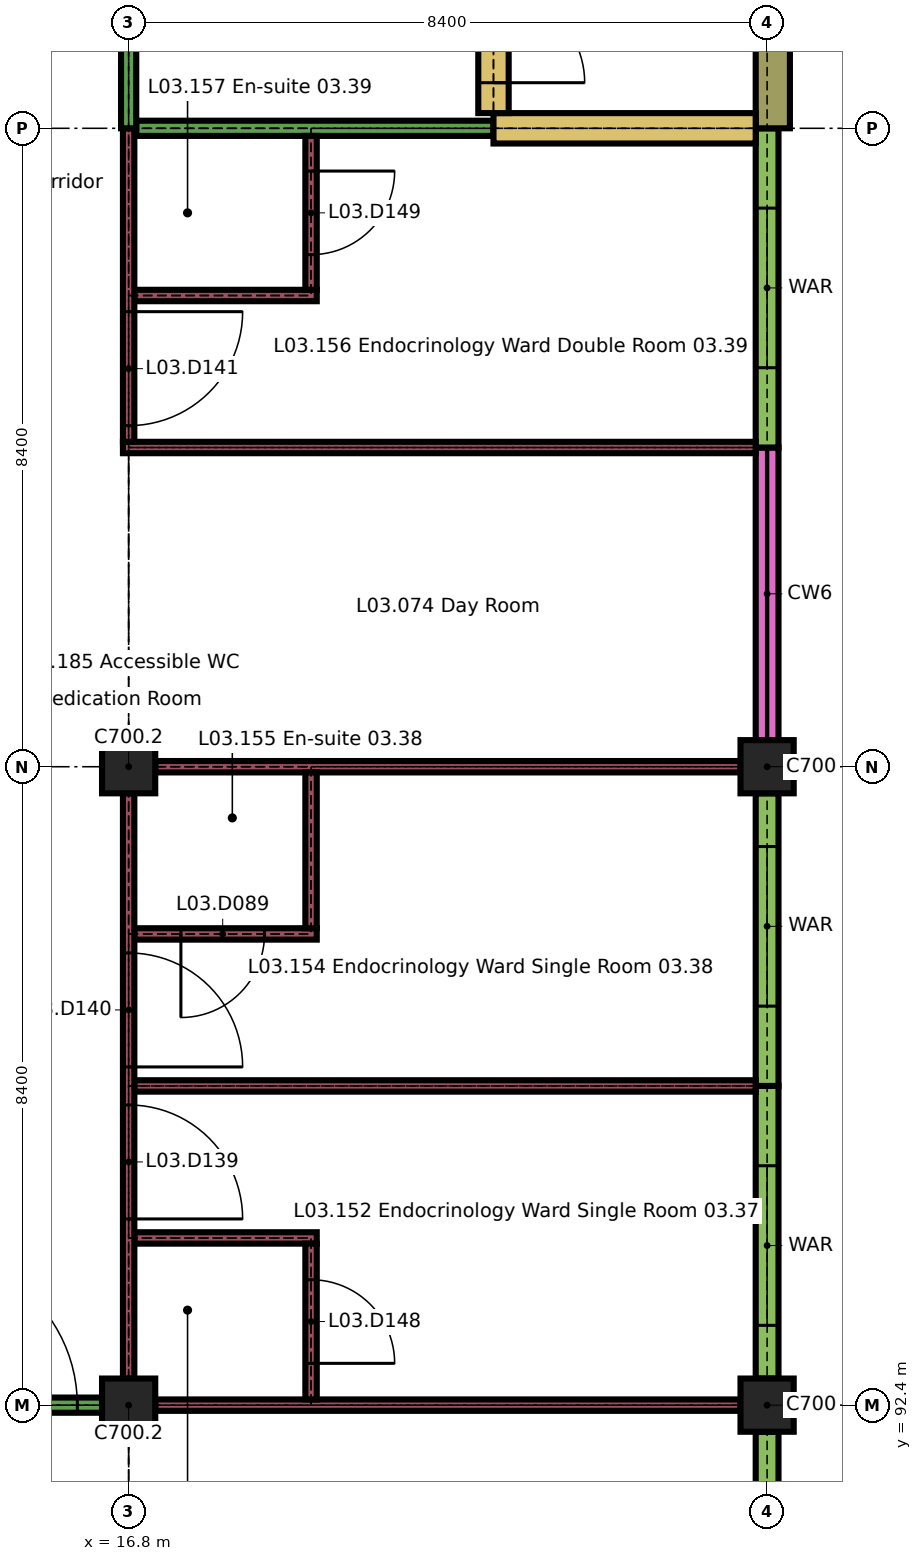
"""IFC4 building model, lengths in metres.
Left out: names, types, materials, properties, quantities, classifications, styles, units other than length and angle.
Written with IfcOpenShell. Run it as: python <this file> out.ifc"""

import sys

from ifc_helpers import new_model, si_unit, direction, frame, frame_2d, origin, origin_2d, place, context, subcontext, project, spatial, rectangle, extrude, element, fill, save


model = new_model("IFC4")
c1 = context("Model", 3, precision=1e-05, world=origin(), true_north=direction((0.0, 1.0)))
c2 = subcontext(c1, "Body", "Model", "MODEL_VIEW")
j1 = project(units=[si_unit("LENGTHUNIT", "METRE"), si_unit("PLANEANGLEUNIT", "RADIAN")], contexts=[c1])
p1 = place(None, origin())
s1 = spatial("IfcSite", under=j1, at=p1, CompositionType="ELEMENT")
p2 = place(p1, origin())
s2 = spatial("IfcBuilding", under=s1, at=p2, CompositionType="ELEMENT")
p3 = place(p2, frame((0.0, 0.0, 15.3)))
s3 = spatial("IfcBuildingStorey", under=s2, at=p3, CompositionType="ELEMENT", Elevation=15.3)
for number, where, z_axis, x_axis in (
    (1, (16.8, 92.4, 0.0), (0.0, 0.0, 1.0), (1.0, 0.0, 0.0)),
    (2, (25.2, 92.4, 0.0), (0.0, 0.0, 1.0), (1.0, 0.0, 0.0)),
    (3, (16.8, 100.8, 0.0), (0.0, 0.0, 1.0), (1.0, 0.0, 0.0)),
    (4, (25.2, 100.8, 0.0), (0.0, 0.0, 1.0), (1.0, 0.0, 0.0)),
):
    element("IfcColumn", number, at=place(p3, frame(where, z_axis=z_axis, x_axis=x_axis)), inside=s3, PredefinedType="COLUMN", context=c2, shape_type="SweptSolid", body=[
        extrude(rectangle(XDim=0.7, YDim=0.7, at=origin_2d()), origin(), (0.0, 0.0, 1.0), 3.26),
    ])
p4 = place(p3, frame((25.2, 90.9, 0.0), z_axis=(0.0, 0.0, 1.0), x_axis=(0.0, 1.0, 0.0)))
e5 = element("IfcWall", 5, at=p4, inside=s3, PredefinedType="SOLIDWALL", context=c2, shape_type="SweptSolid", body=[
    extrude(rectangle(XDim=1.15, YDim=0.3, at=frame_2d((0.575, 0.0))), origin(), (0.0, 0.0, 1.0), 2.96),
])
p5 = place(p3, frame((25.2, 92.75, 0.0), z_axis=(0.0, 0.0, 1.0), x_axis=(0.0, 1.0, 0.0)))
e6 = element("IfcWall", 6, at=p5, inside=s3, PredefinedType="SOLIDWALL", context=c2, shape_type="SweptSolid", body=[
    extrude(rectangle(XDim=3.85, YDim=0.3, at=frame_2d((1.925, 0.0))), origin(), (0.0, 0.0, 1.0), 2.96),
])
p6 = place(p5, frame((0.7, 0.0, 0.9)))
e7 = element("IfcOpeningElement", 7, at=p6, cuts=e6, PredefinedType="OPENING", context=c2, shape_type="SweptSolid", body=[
    extrude(rectangle(XDim=2.1, YDim=1.5, at=frame_2d((1.05, 0.75))), frame((0.0, 0.16, 0.0), z_axis=(0.0, -1.0, 0.0), x_axis=(1.0, 0.0, 0.0)), (0.0, 0.0, 1.0), 0.32),
])
p7 = place(p3, frame((25.2, 96.6, 0.0), z_axis=(0.0, 0.0, 1.0), x_axis=(0.0, 1.0, 0.0)))
e8 = element("IfcWall", 8, at=p7, inside=s3, PredefinedType="SOLIDWALL", context=c2, shape_type="SweptSolid", body=[
    extrude(rectangle(XDim=3.85, YDim=0.3, at=frame_2d((1.925, 0.0))), origin(), (0.0, 0.0, 1.0), 2.96),
])
p8 = place(p7, frame((1.05, 0.0, 0.9)))
e9 = element("IfcOpeningElement", 9, at=p8, cuts=e8, PredefinedType="OPENING", context=c2, shape_type="SweptSolid", body=[
    extrude(rectangle(XDim=2.1, YDim=1.5, at=frame_2d((1.05, 0.75))), frame((0.0, 0.16, 0.0), z_axis=(0.0, -1.0, 0.0), x_axis=(1.0, 0.0, 0.0)), (0.0, 0.0, 1.0), 0.32),
])
p9 = place(p3, frame((25.2, 101.15, 0.0), z_axis=(0.0, 0.0, 1.0), x_axis=(0.0, 1.0, 0.0)))
e10 = element("IfcWall", 10, at=p9, inside=s3, PredefinedType="SOLIDWALL", context=c2, shape_type="SweptSolid", body=[
    extrude(rectangle(XDim=3.85, YDim=0.3, at=frame_2d((1.925, 0.0))), origin(), (0.0, 0.0, 1.0), 0.6),
])
p10 = place(p3, frame((25.2, 105.0, 0.0), z_axis=(0.0, 0.0, 1.0), x_axis=(0.0, 1.0, 0.0)))
e11 = element("IfcWall", 11, at=p10, inside=s3, PredefinedType="SOLIDWALL", context=c2, shape_type="SweptSolid", body=[
    extrude(rectangle(XDim=4.2, YDim=0.3, at=frame_2d((2.1, 0.0))), origin(), (0.0, 0.0, 1.0), 2.96),
])
p11 = place(p10, frame((1.05, 0.0, 0.9)))
e12 = element("IfcOpeningElement", 12, at=p11, cuts=e11, PredefinedType="OPENING", context=c2, shape_type="SweptSolid", body=[
    extrude(rectangle(XDim=2.1, YDim=1.5, at=frame_2d((1.05, 0.75))), frame((0.0, 0.16, 0.0), z_axis=(0.0, -1.0, 0.0), x_axis=(1.0, 0.0, 0.0)), (0.0, 0.0, 1.0), 0.32),
])
p12 = place(p3, frame((25.275, 109.2, 0.0), z_axis=(0.0, 0.0, 1.0), x_axis=(0.0, 1.0, 0.0)))
e13 = element("IfcWall", 13, at=p12, inside=s3, PredefinedType="SOLIDWALL", context=c2, shape_type="SweptSolid", body=[
    extrude(rectangle(XDim=3.15, YDim=0.45, at=frame_2d((1.575, 0.0))), origin(), (0.0, 0.0, 1.0), 3.26),
])
p13 = place(p3, frame((8.75, 92.4, 0.0), z_axis=(0.0, 0.0, 1.0), x_axis=(1.0, 0.0, 0.0)))
e14 = element("IfcWall", 14, at=p13, inside=s3, PredefinedType="PARTITIONING", context=c2, shape_type="SweptSolid", body=[
    extrude(rectangle(XDim=7.7, YDim=0.2, at=frame_2d((3.85, 0.0))), origin(), (0.0, 0.0, 1.0), 3.26),
])
p14 = place(p13, frame((0.325, 0.0, 0.0)))
e15 = element("IfcOpeningElement", 15, at=p14, cuts=e14, PredefinedType="OPENING", context=c2, shape_type="SweptSolid", body=[
    extrude(rectangle(XDim=2.0, YDim=2.4, at=frame_2d((1.0, 1.2))), frame((0.0, 0.11, 0.0), z_axis=(0.0, -1.0, 0.0), x_axis=(1.0, 0.0, 0.0)), (0.0, 0.0, 1.0), 0.22),
])
p15 = place(p13, frame((5.375, 0.0, 0.0)))
e16 = element("IfcOpeningElement", 16, at=p15, cuts=e14, PredefinedType="OPENING", context=c2, shape_type="SweptSolid", body=[
    extrude(rectangle(XDim=2.0, YDim=2.4, at=frame_2d((1.0, 1.2))), frame((0.0, 0.11, 0.0), z_axis=(0.0, -1.0, 0.0), x_axis=(1.0, 0.0, 0.0)), (0.0, 0.0, 1.0), 0.22),
])
p16 = place(p3, frame((17.15, 92.4, 0.0), z_axis=(0.0, 0.0, 1.0), x_axis=(1.0, 0.0, 0.0)))
e17 = element("IfcWall", 17, at=p16, inside=s3, PredefinedType="PARTITIONING", context=c2, shape_type="SweptSolid", body=[
    extrude(rectangle(XDim=7.7, YDim=0.15, at=frame_2d((3.85, 0.0))), origin(), (0.0, 0.0, 1.0), 3.26),
])
p17 = place(p3, frame((16.875, 94.6, 0.0), z_axis=(0.0, 0.0, 1.0), x_axis=(1.0, 0.0, 0.0)))
e18 = element("IfcWall", 18, at=p17, inside=s3, PredefinedType="PARTITIONING", context=c2, shape_type="SweptSolid", body=[
    extrude(rectangle(XDim=2.4, YDim=0.15, at=frame_2d((1.2, 0.0))), origin(), (0.0, 0.0, 1.0), 3.26),
])
p18 = place(p3, frame((16.875, 96.6, 0.0), z_axis=(0.0, 0.0, 1.0), x_axis=(1.0, 0.0, 0.0)))
e19 = element("IfcWall", 19, at=p18, inside=s3, PredefinedType="PARTITIONING", context=c2, shape_type="SweptSolid", body=[
    extrude(rectangle(XDim=8.175, YDim=0.15, at=frame_2d((4.087, 0.0))), origin(), (0.0, 0.0, 1.0), 3.26),
])
p19 = place(p3, frame((16.875, 98.6, 0.0), z_axis=(0.0, 0.0, 1.0), x_axis=(1.0, 0.0, 0.0)))
e20 = element("IfcWall", 20, at=p19, inside=s3, PredefinedType="PARTITIONING", context=c2, shape_type="SweptSolid", body=[
    extrude(rectangle(XDim=2.4, YDim=0.15, at=frame_2d((1.2, 0.0))), origin(), (0.0, 0.0, 1.0), 3.26),
])
p20 = place(p19, frame((0.613, 0.0, 0.0)))
e21 = element("IfcOpeningElement", 21, at=p20, cuts=e20, PredefinedType="OPENING", context=c2, shape_type="SweptSolid", body=[
    extrude(rectangle(XDim=1.1, YDim=2.1, at=frame_2d((0.55, 1.05))), frame((0.0, 0.085, 0.0), z_axis=(0.0, -1.0, 0.0), x_axis=(1.0, 0.0, 0.0)), (0.0, 0.0, 1.0), 0.17),
])
p21 = place(p3, frame((17.15, 100.8, 0.0), z_axis=(0.0, 0.0, 1.0), x_axis=(1.0, 0.0, 0.0)))
e22 = element("IfcWall", 22, at=p21, inside=s3, PredefinedType="PARTITIONING", context=c2, shape_type="SweptSolid", body=[
    extrude(rectangle(XDim=7.7, YDim=0.15, at=frame_2d((3.85, 0.0))), origin(), (0.0, 0.0, 1.0), 3.26),
])
p22 = place(p3, frame((16.725, 105.0, 0.0), z_axis=(0.0, 0.0, 1.0), x_axis=(1.0, 0.0, 0.0)))
e23 = element("IfcWall", 23, at=p22, inside=s3, PredefinedType="PARTITIONING", context=c2, shape_type="SweptSolid", body=[
    extrude(rectangle(XDim=8.325, YDim=0.15, at=frame_2d((4.163, 0.0))), origin(), (0.0, 0.0, 1.0), 3.26),
])
p23 = place(p3, frame((16.875, 107.0, 0.0), z_axis=(0.0, 0.0, 1.0), x_axis=(1.0, 0.0, 0.0)))
e24 = element("IfcWall", 24, at=p23, inside=s3, PredefinedType="PARTITIONING", context=c2, shape_type="SweptSolid", body=[
    extrude(rectangle(XDim=2.4, YDim=0.15, at=frame_2d((1.2, 0.0))), origin(), (0.0, 0.0, 1.0), 3.26),
])
p24 = place(p3, frame((16.9, 109.2, 0.0), z_axis=(0.0, 0.0, 1.0), x_axis=(1.0, 0.0, 0.0)))
e25 = element("IfcWall", 25, at=p24, inside=s3, PredefinedType="PARTITIONING", context=c2, shape_type="SweptSolid", body=[
    extrude(rectangle(XDim=4.7, YDim=0.2, at=frame_2d((2.35, 0.0))), origin(), (0.0, 0.0, 1.0), 3.26),
])
p25 = place(p3, frame((21.6, 109.2, 0.0), z_axis=(0.0, 0.0, 1.0), x_axis=(1.0, 0.0, 0.0)))
e26 = element("IfcWall", 26, at=p25, inside=s3, PredefinedType="SHEAR", context=c2, shape_type="SweptSolid", body=[
    extrude(rectangle(XDim=3.45, YDim=0.4, at=frame_2d((1.725, 0.0))), origin(), (0.0, 0.0, 1.0), 3.26),
])
p26 = place(p3, frame((16.8, 92.75, 0.0), z_axis=(0.0, 0.0, 1.0), x_axis=(0.0, 1.0, 0.0)))
e27 = element("IfcWall", 27, at=p26, inside=s3, PredefinedType="PARTITIONING", context=c2, shape_type="SweptSolid", body=[
    extrude(rectangle(XDim=7.7, YDim=0.15, at=frame_2d((3.85, 0.0))), origin(), (0.0, 0.0, 1.0), 3.26),
])
p27 = place(p26, frame((2.1, 0.0, 0.0)))
e28 = element("IfcOpeningElement", 28, at=p27, cuts=e27, PredefinedType="OPENING", context=c2, shape_type="SweptSolid", body=[
    extrude(rectangle(XDim=1.5, YDim=2.4, at=frame_2d((0.75, 1.2))), frame((0.0, 0.085, 0.0), z_axis=(0.0, -1.0, 0.0), x_axis=(1.0, 0.0, 0.0)), (0.0, 0.0, 1.0), 0.17),
])
p28 = place(p26, frame((4.1, 0.0, 0.0)))
e29 = element("IfcOpeningElement", 29, at=p28, cuts=e27, PredefinedType="OPENING", context=c2, shape_type="SweptSolid", body=[
    extrude(rectangle(XDim=1.5, YDim=2.4, at=frame_2d((0.75, 1.2))), frame((0.0, 0.085, 0.0), z_axis=(0.0, -1.0, 0.0), x_axis=(1.0, 0.0, 0.0)), (0.0, 0.0, 1.0), 0.17),
])
p29 = place(p3, frame((16.8, 105.075, 0.0), z_axis=(0.0, 0.0, 1.0), x_axis=(0.0, 1.0, 0.0)))
e30 = element("IfcWall", 30, at=p29, inside=s3, PredefinedType="PARTITIONING", context=c2, shape_type="SweptSolid", body=[
    extrude(rectangle(XDim=4.125, YDim=0.15, at=frame_2d((2.062, 0.0))), origin(), (0.0, 0.0, 1.0), 3.26),
])
p30 = place(p29, frame((0.212, 0.0, 0.0)))
e31 = element("IfcOpeningElement", 31, at=p30, cuts=e30, PredefinedType="OPENING", context=c2, shape_type="SweptSolid", body=[
    extrude(rectangle(XDim=1.5, YDim=2.4, at=frame_2d((0.75, 1.2))), frame((0.0, 0.085, 0.0), z_axis=(0.0, -1.0, 0.0), x_axis=(1.0, 0.0, 0.0)), (0.0, 0.0, 1.0), 0.17),
])
p31 = place(p3, frame((16.8, 109.2, 0.0), z_axis=(0.0, 0.0, 1.0), x_axis=(0.0, 1.0, 0.0)))
e32 = element("IfcWall", 32, at=p31, inside=s3, PredefinedType="PARTITIONING", context=c2, shape_type="SweptSolid", body=[
    extrude(rectangle(XDim=8.25, YDim=0.2, at=frame_2d((4.125, 0.0))), origin(), (0.0, 0.0, 1.0), 3.26),
])
p32 = place(p31, frame((3.125, 0.0, 0.0)))
e33 = element("IfcOpeningElement", 33, at=p32, cuts=e32, PredefinedType="OPENING", context=c2, shape_type="SweptSolid", body=[
    extrude(rectangle(XDim=2.0, YDim=2.4, at=frame_2d((1.0, 1.2))), frame((0.0, 0.11, 0.0), z_axis=(0.0, -1.0, 0.0), x_axis=(1.0, 0.0, 0.0)), (0.0, 0.0, 1.0), 0.22),
])
p33 = place(p3, frame((19.2, 92.475, 0.0), z_axis=(0.0, 0.0, 1.0), x_axis=(0.0, 1.0, 0.0)))
e34 = element("IfcWall", 34, at=p33, inside=s3, PredefinedType="PARTITIONING", context=c2, shape_type="SweptSolid", body=[
    extrude(rectangle(XDim=2.05, YDim=0.15, at=frame_2d((1.025, 0.0))), origin(), (0.0, 0.0, 1.0), 3.26),
])
p34 = place(p33, frame((0.475, 0.0, 0.0)))
e35 = element("IfcOpeningElement", 35, at=p34, cuts=e34, PredefinedType="OPENING", context=c2, shape_type="SweptSolid", body=[
    extrude(rectangle(XDim=1.1, YDim=2.1, at=frame_2d((0.55, 1.05))), frame((0.0, 0.085, 0.0), z_axis=(0.0, -1.0, 0.0), x_axis=(1.0, 0.0, 0.0)), (0.0, 0.0, 1.0), 0.17),
])
p35 = place(p3, frame((19.2, 98.675, 0.0), z_axis=(0.0, 0.0, 1.0), x_axis=(0.0, 1.0, 0.0)))
e36 = element("IfcWall", 36, at=p35, inside=s3, PredefinedType="PARTITIONING", context=c2, shape_type="SweptSolid", body=[
    extrude(rectangle(XDim=2.05, YDim=0.15, at=frame_2d((1.025, 0.0))), origin(), (0.0, 0.0, 1.0), 3.26),
])
p36 = place(p3, frame((19.2, 107.075, 0.0), z_axis=(0.0, 0.0, 1.0), x_axis=(0.0, 1.0, 0.0)))
e37 = element("IfcWall", 37, at=p36, inside=s3, PredefinedType="PARTITIONING", context=c2, shape_type="SweptSolid", body=[
    extrude(rectangle(XDim=2.025, YDim=0.15, at=frame_2d((1.013, 0.0))), origin(), (0.0, 0.0, 1.0), 3.26),
])
p37 = place(p36, frame((0.462, 0.0, 0.0)))
e38 = element("IfcOpeningElement", 38, at=p37, cuts=e37, PredefinedType="OPENING", context=c2, shape_type="SweptSolid", body=[
    extrude(rectangle(XDim=1.1, YDim=2.1, at=frame_2d((0.55, 1.05))), frame((0.0, 0.085, 0.0), z_axis=(0.0, -1.0, 0.0), x_axis=(1.0, 0.0, 0.0)), (0.0, 0.0, 1.0), 0.17),
])
p38 = place(p3, frame((21.6, 109.4, 0.0), z_axis=(0.0, 0.0, 1.0), x_axis=(0.0, 1.0, 0.0)))
e39 = element("IfcWall", 39, at=p38, inside=s3, PredefinedType="SHEAR", context=c2, shape_type="SweptSolid", body=[
    extrude(rectangle(XDim=8.05, YDim=0.4, at=frame_2d((4.025, 0.0))), origin(), (0.0, 0.0, 1.0), 3.26),
])
p39 = place(p38, frame((0.4, 0.0, 0.0)))
e40 = element("IfcOpeningElement", 40, at=p39, cuts=e39, PredefinedType="OPENING", context=c2, shape_type="SweptSolid", body=[
    extrude(rectangle(XDim=1.2, YDim=2.1, at=frame_2d((0.6, 1.05))), frame((0.0, 0.21, 0.0), z_axis=(0.0, -1.0, 0.0), x_axis=(1.0, 0.0, 0.0)), (0.0, 0.0, 1.0), 0.42),
])
p40 = place(p6, origin())
e41 = element("IfcWindow", 41, at=p40, inside=s3, PartitioningType="DOUBLE_PANEL_VERTICAL", PredefinedType="WINDOW", context=c2, shape_type="SweptSolid", body=[
    extrude(rectangle(XDim=2.1, YDim=1.5, at=frame_2d((1.05, 0.75))), frame((0.0, 0.05, 0.0), z_axis=(0.0, -1.0, 0.0), x_axis=(1.0, 0.0, 0.0)), (0.0, 0.0, 1.0), 0.1),
])
fill(e7, e41)
p41 = place(p8, origin())
e42 = element("IfcWindow", 42, at=p41, inside=s3, PartitioningType="DOUBLE_PANEL_VERTICAL", PredefinedType="WINDOW", context=c2, shape_type="SweptSolid", body=[
    extrude(rectangle(XDim=2.1, YDim=1.5, at=frame_2d((1.05, 0.75))), frame((0.0, 0.05, 0.0), z_axis=(0.0, -1.0, 0.0), x_axis=(1.0, 0.0, 0.0)), (0.0, 0.0, 1.0), 0.1),
])
fill(e9, e42)
p42 = place(p11, origin())
e43 = element("IfcWindow", 43, at=p42, inside=s3, PartitioningType="DOUBLE_PANEL_VERTICAL", PredefinedType="WINDOW", context=c2, shape_type="SweptSolid", body=[
    extrude(rectangle(XDim=2.1, YDim=1.5, at=frame_2d((1.05, 0.75))), frame((0.0, 0.05, 0.0), z_axis=(0.0, -1.0, 0.0), x_axis=(1.0, 0.0, 0.0)), (0.0, 0.0, 1.0), 0.1),
])
fill(e12, e43)
p43 = place(p15, origin())
e44 = element("IfcDoor", 44, at=p43, inside=s3, OperationType="SINGLE_SWING_RIGHT", PredefinedType="DOOR", context=c2, shape_type="SweptSolid", body=[
    extrude(rectangle(XDim=2.0, YDim=2.4, at=frame_2d((1.0, 1.2))), frame((0.0, 0.03, 0.0), z_axis=(0.0, -1.0, 0.0), x_axis=(1.0, 0.0, 0.0)), (0.0, 0.0, 1.0), 0.06),
])
fill(e16, e44)
p44 = place(p20, origin())
e45 = element("IfcDoor", 45, at=p44, inside=s3, OperationType="SINGLE_SWING_LEFT", PredefinedType="DOOR", context=c2, shape_type="SweptSolid", body=[
    extrude(rectangle(XDim=1.1, YDim=2.1, at=frame_2d((0.55, 1.05))), frame((0.0, 0.025, 0.0), z_axis=(0.0, -1.0, 0.0), x_axis=(1.0, 0.0, 0.0)), (0.0, 0.0, 1.0), 0.05),
])
fill(e21, e45)
p45 = place(p27, origin())
e46 = element("IfcDoor", 46, at=p45, inside=s3, OperationType="SINGLE_SWING_LEFT", PredefinedType="DOOR", context=c2, shape_type="SweptSolid", body=[
    extrude(rectangle(XDim=1.5, YDim=2.4, at=frame_2d((0.75, 1.2))), frame((0.0, 0.03, 0.0), z_axis=(0.0, -1.0, 0.0), x_axis=(1.0, 0.0, 0.0)), (0.0, 0.0, 1.0), 0.06),
])
fill(e28, e46)
p46 = place(p28, origin())
e47 = element("IfcDoor", 47, at=p46, inside=s3, OperationType="SINGLE_SWING_LEFT", PredefinedType="DOOR", context=c2, shape_type="SweptSolid", body=[
    extrude(rectangle(XDim=1.5, YDim=2.4, at=frame_2d((0.75, 1.2))), frame((0.0, 0.03, 0.0), z_axis=(0.0, -1.0, 0.0), x_axis=(1.0, 0.0, 0.0)), (0.0, 0.0, 1.0), 0.06),
])
fill(e29, e47)
p47 = place(p30, origin())
e48 = element("IfcDoor", 48, at=p47, inside=s3, OperationType="SINGLE_SWING_RIGHT", PredefinedType="DOOR", context=c2, shape_type="SweptSolid", body=[
    extrude(rectangle(XDim=1.5, YDim=2.4, at=frame_2d((0.75, 1.2))), frame((0.0, 0.03, 0.0), z_axis=(0.0, -1.0, 0.0), x_axis=(1.0, 0.0, 0.0)), (0.0, 0.0, 1.0), 0.06),
])
fill(e31, e48)
p48 = place(p34, origin())
e49 = element("IfcDoor", 49, at=p48, inside=s3, OperationType="SINGLE_SWING_LEFT", PredefinedType="DOOR", context=c2, shape_type="SweptSolid", body=[
    extrude(rectangle(XDim=1.1, YDim=2.1, at=frame_2d((0.55, 1.05))), frame((0.0, 0.025, 0.0), z_axis=(0.0, -1.0, 0.0), x_axis=(1.0, 0.0, 0.0)), (0.0, 0.0, 1.0), 0.05),
])
fill(e35, e49)
p49 = place(p37, origin())
e50 = element("IfcDoor", 50, at=p49, inside=s3, OperationType="SINGLE_SWING_RIGHT", PredefinedType="DOOR", context=c2, shape_type="SweptSolid", body=[
    extrude(rectangle(XDim=1.1, YDim=2.1, at=frame_2d((0.55, 1.05))), frame((0.0, 0.025, 0.0), z_axis=(0.0, -1.0, 0.0), x_axis=(1.0, 0.0, 0.0)), (0.0, 0.0, 1.0), 0.05),
])
fill(e38, e50)
p50 = place(p39, origin())
e51 = element("IfcDoor", 51, at=p50, inside=s3, OperationType="SINGLE_SWING_LEFT", PredefinedType="DOOR", context=c2, shape_type="SweptSolid", body=[
    extrude(rectangle(XDim=1.2, YDim=2.1, at=frame_2d((0.6, 1.05))), frame((0.0, 0.025, 0.0), z_axis=(0.0, -1.0, 0.0), x_axis=(1.0, 0.0, 0.0)), (0.0, 0.0, 1.0), 0.05),
])
fill(e40, e51)
save(model, sys.argv[1])
